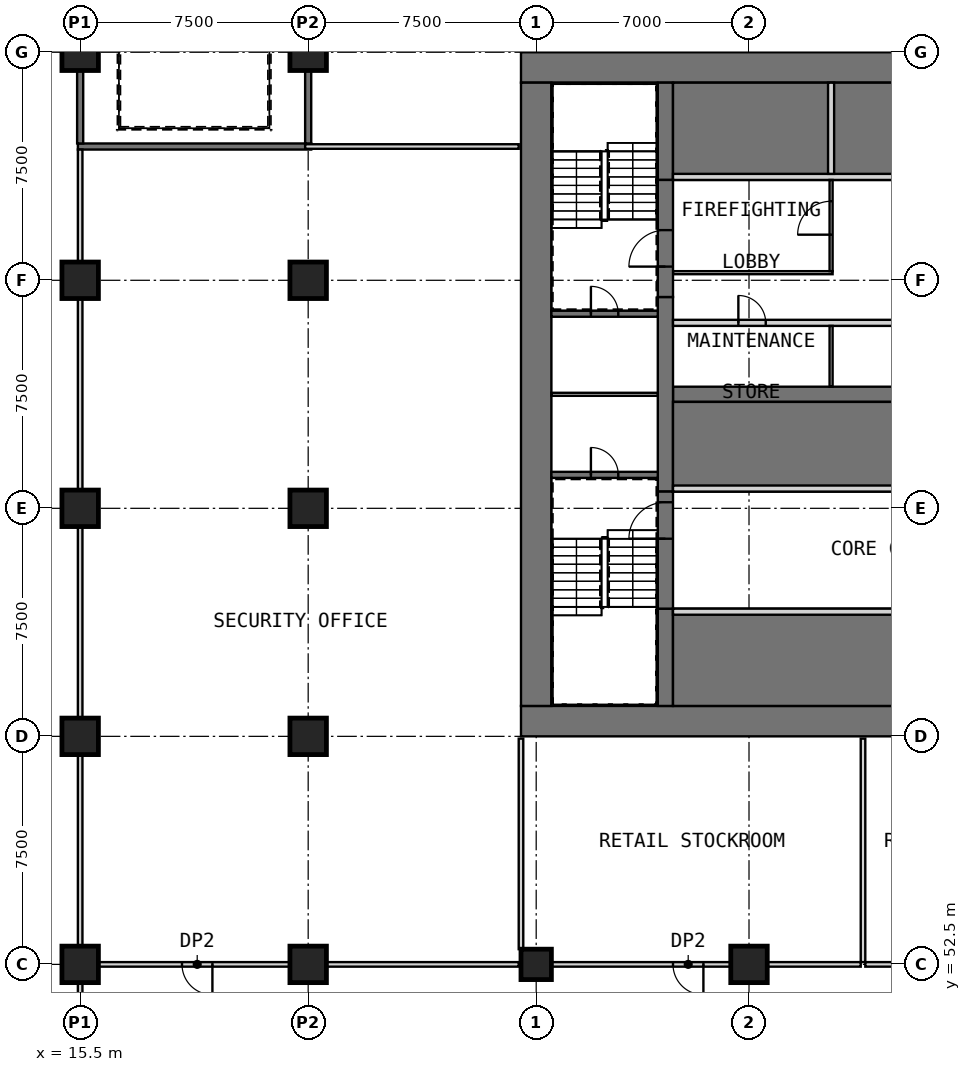
"""IFC4 building model, lengths in metres.
Left out: names, types, materials, properties, quantities, classifications, styles, units other than length and angle.
Written with IfcOpenShell. Run it as: python <this file> out.ifc"""

import sys

from ifc_helpers import new_model, si_unit, direction, frame, frame_2d, origin, origin_2d, place, context, subcontext, project, spatial, rectangle, extrude, element, fill, save


model = new_model("IFC4")
c1 = context("Model", 3, precision=1e-05, world=origin(), true_north=direction((0.0, 1.0)))
c2 = subcontext(c1, "Body", "Model", "MODEL_VIEW")
j1 = project(units=[si_unit("LENGTHUNIT", "METRE"), si_unit("PLANEANGLEUNIT", "RADIAN")], contexts=[c1])
p1 = place(None, origin())
s1 = spatial("IfcSite", under=j1, at=p1, CompositionType="ELEMENT")
p2 = place(p1, origin())
s2 = spatial("IfcBuilding", under=s1, at=p2, CompositionType="ELEMENT")
p3 = place(p2, frame((0.0, 0.0, -6.0)))
s3 = spatial("IfcBuildingStorey", under=s2, at=p3, CompositionType="ELEMENT", Elevation=-6.0)
p4 = place(p3, frame((30.5, 52.5, 0.0), z_axis=(0.0, 0.0, 1.0), x_axis=(1.0, 0.0, 0.0)))
e1 = element("IfcColumn", 1, at=p4, inside=s3, PredefinedType="COLUMN", context=c2, shape_type="SweptSolid", body=[
    extrude(rectangle(XDim=1.0, YDim=1.0, at=origin_2d()), origin(), (0.0, 0.0, 1.0), 6.0),
])
for number, where, z_axis, x_axis in (
    (2, (37.5, 52.5, 0.0), (0.0, 0.0, 1.0), (1.0, 0.0, 0.0)),
    (3, (15.5, 52.5, 0.0), (0.0, 0.0, 1.0), (1.0, 0.0, 0.0)),
    (4, (15.5, 60.0, 0.0), (0.0, 0.0, 1.0), (1.0, 0.0, 0.0)),
    (5, (15.5, 67.5, 0.0), (0.0, 0.0, 1.0), (1.0, 0.0, 0.0)),
    (6, (15.5, 75.0, 0.0), (0.0, 0.0, 1.0), (1.0, 0.0, 0.0)),
    (7, (15.5, 82.5, 0.0), (0.0, 0.0, 1.0), (1.0, 0.0, 0.0)),
    (8, (23.0, 52.5, 0.0), (0.0, 0.0, 1.0), (1.0, 0.0, 0.0)),
    (9, (23.0, 60.0, 0.0), (0.0, 0.0, 1.0), (1.0, 0.0, 0.0)),
    (10, (23.0, 67.5, 0.0), (0.0, 0.0, 1.0), (1.0, 0.0, 0.0)),
    (11, (23.0, 75.0, 0.0), (0.0, 0.0, 1.0), (1.0, 0.0, 0.0)),
    (12, (23.0, 82.5, 0.0), (0.0, 0.0, 1.0), (1.0, 0.0, 0.0)),
):
    element("IfcColumn", number, at=place(p3, frame(where, z_axis=z_axis, x_axis=x_axis)), inside=s3, PredefinedType="COLUMN", context=c2, shape_type="SweptSolid", body=[
        extrude(rectangle(XDim=1.2, YDim=1.2, at=origin_2d()), origin(), (0.0, 0.0, 1.0), 6.0),
    ])
p5 = place(p3, frame((30.0, 60.5, 0.0), z_axis=(0.0, 0.0, 1.0), x_axis=(1.0, 0.0, 0.0)))
e13 = element("IfcWall", 13, at=p5, inside=s3, PredefinedType="SHEAR", context=c2, shape_type="SweptSolid", body=[
    extrude(rectangle(XDim=30.0, YDim=1.0, at=frame_2d((15.0, 0.0))), origin(), (0.0, 0.0, 1.0), 6.0),
])
p6 = place(p5, frame((21.9, 0.0, 0.0)))
e14 = element("IfcOpeningElement", 14, at=p6, cuts=e13, PredefinedType="OPENING", context=c2, shape_type="SweptSolid", body=[
    extrude(rectangle(XDim=1.8, YDim=2.1, at=frame_2d((0.9, 1.05))), frame((0.0, 0.51, 0.0), z_axis=(0.0, -1.0, 0.0), x_axis=(1.0, 0.0, 0.0)), (0.0, 0.0, 1.0), 1.02),
])
p7 = place(p5, frame((26.5, 0.0, 0.0)))
e15 = element("IfcOpeningElement", 15, at=p7, cuts=e13, PredefinedType="OPENING", context=c2, shape_type="SweptSolid", body=[
    extrude(rectangle(XDim=1.2, YDim=2.1, at=frame_2d((0.6, 1.05))), frame((0.0, 0.51, 0.0), z_axis=(0.0, -1.0, 0.0), x_axis=(1.0, 0.0, 0.0)), (0.0, 0.0, 1.0), 1.02),
])
p8 = place(p3, frame((30.0, 82.0, 0.0), z_axis=(0.0, 0.0, 1.0), x_axis=(1.0, 0.0, 0.0)))
e16 = element("IfcWall", 16, at=p8, inside=s3, PredefinedType="SHEAR", context=c2, shape_type="SweptSolid", body=[
    extrude(rectangle(XDim=30.0, YDim=1.0, at=frame_2d((15.0, 0.0))), origin(), (0.0, 0.0, 1.0), 6.0),
])
p9 = place(p3, frame((30.5, 61.0, 0.0), z_axis=(0.0, 0.0, 1.0), x_axis=(0.0, 1.0, 0.0)))
e17 = element("IfcWall", 17, at=p9, inside=s3, PredefinedType="SHEAR", context=c2, shape_type="SweptSolid", body=[
    extrude(rectangle(XDim=20.5, YDim=1.0, at=frame_2d((10.25, 0.0))), origin(), (0.0, 0.0, 1.0), 6.0),
])
p10 = place(p3, frame((35.0, 71.25, 0.0), z_axis=(0.0, 0.0, 1.0), x_axis=(1.0, 0.0, 0.0)))
e18 = element("IfcWall", 18, at=p10, inside=s3, PredefinedType="SHEAR", context=c2, shape_type="SweptSolid", body=[
    extrude(rectangle(XDim=15.6, YDim=0.5, at=frame_2d((7.8, 0.0))), origin(), (0.0, 0.0, 1.0), 6.0),
])
p11 = place(p3, frame((34.75, 61.0, 0.0), z_axis=(0.0, 0.0, 1.0), x_axis=(0.0, 1.0, 0.0)))
e19 = element("IfcWall", 19, at=p11, inside=s3, PredefinedType="SHEAR", context=c2, shape_type="SweptSolid", body=[
    extrude(rectangle(XDim=3.2, YDim=0.5, at=frame_2d((1.6, 0.0))), origin(), (0.0, 0.0, 1.0), 6.0),
])
p12 = place(p3, frame((34.75, 68.05, 0.0), z_axis=(0.0, 0.0, 1.0), x_axis=(0.0, 1.0, 0.0)))
e20 = element("IfcWall", 20, at=p12, inside=s3, PredefinedType="SHEAR", context=c2, shape_type="SweptSolid", body=[
    extrude(rectangle(XDim=6.4, YDim=0.5, at=frame_2d((3.2, 0.0))), origin(), (0.0, 0.0, 1.0), 6.0),
])
p13 = place(p3, frame((34.75, 78.3, 0.0), z_axis=(0.0, 0.0, 1.0), x_axis=(0.0, 1.0, 0.0)))
e21 = element("IfcWall", 21, at=p13, inside=s3, PredefinedType="SHEAR", context=c2, shape_type="SweptSolid", body=[
    extrude(rectangle(XDim=3.2, YDim=0.5, at=frame_2d((1.6, 0.0))), origin(), (0.0, 0.0, 1.0), 6.0),
])
p14 = place(p3, frame((35.0, 62.6, 0.0), z_axis=(0.0, 0.0, 1.0), x_axis=(1.0, 0.0, 0.0)))
e22 = element("IfcWall", 22, at=p14, inside=s3, PredefinedType="SOLIDWALL", context=c2, shape_type="SweptSolid", body=[
    extrude(rectangle(XDim=13.0, YDim=3.2, at=frame_2d((6.5, 0.0))), origin(), (0.0, 0.0, 1.0), 4.4),
])
p15 = place(p3, frame((35.0, 64.1, 4.4), z_axis=(0.0, 0.0, 1.0), x_axis=(1.0, 0.0, 0.0)))
e23 = element("IfcWall", 23, at=p15, inside=s3, PredefinedType="SOLIDWALL", context=c2, shape_type="SweptSolid", body=[
    extrude(rectangle(XDim=13.0, YDim=0.2, at=frame_2d((6.5, 0.0))), origin(), (0.0, 0.0, 1.0), 1.6),
])
p16 = place(p3, frame((35.0, 69.525, 0.0), z_axis=(0.0, 0.0, 1.0), x_axis=(1.0, 0.0, 0.0)))
e24 = element("IfcWall", 24, at=p16, inside=s3, PredefinedType="SOLIDWALL", context=c2, shape_type="SweptSolid", body=[
    extrude(rectangle(XDim=13.0, YDim=2.95, at=frame_2d((6.5, 0.0))), origin(), (0.0, 0.0, 1.0), 4.4),
])
p17 = place(p3, frame((35.0, 68.15, 4.4), z_axis=(0.0, 0.0, 1.0), x_axis=(1.0, 0.0, 0.0)))
e25 = element("IfcWall", 25, at=p17, inside=s3, PredefinedType="SOLIDWALL", context=c2, shape_type="SweptSolid", body=[
    extrude(rectangle(XDim=13.0, YDim=0.2, at=frame_2d((6.5, 0.0))), origin(), (0.0, 0.0, 1.0), 1.6),
])
p18 = place(p3, frame((35.0, 73.6, 0.0), z_axis=(0.0, 0.0, 1.0), x_axis=(1.0, 0.0, 0.0)))
e26 = element("IfcWall", 26, at=p18, inside=s3, PredefinedType="PARTITIONING", context=c2, shape_type="SweptSolid", body=[
    extrude(rectangle(XDim=15.6, YDim=0.2, at=frame_2d((7.8, 0.0))), origin(), (0.0, 0.0, 1.0), 5.7),
])
p19 = place(p18, frame((2.15, 0.0, 0.0)))
e27 = element("IfcOpeningElement", 27, at=p19, cuts=e26, PredefinedType="OPENING", context=c2, shape_type="SweptSolid", body=[
    extrude(rectangle(XDim=0.9, YDim=2.1, at=frame_2d((0.45, 1.05))), frame((0.0, 0.11, 0.0), z_axis=(0.0, -1.0, 0.0), x_axis=(1.0, 0.0, 0.0)), (0.0, 0.0, 1.0), 0.22),
])
p20 = place(p18, frame((9.95, 0.0, 0.0)))
e28 = element("IfcOpeningElement", 28, at=p20, cuts=e26, PredefinedType="OPENING", context=c2, shape_type="SweptSolid", body=[
    extrude(rectangle(XDim=0.9, YDim=2.1, at=frame_2d((0.45, 1.05))), frame((0.0, 0.11, 0.0), z_axis=(0.0, -1.0, 0.0), x_axis=(1.0, 0.0, 0.0)), (0.0, 0.0, 1.0), 0.22),
])
p21 = place(p3, frame((40.2, 71.5, 0.0), z_axis=(0.0, 0.0, 1.0), x_axis=(0.0, 1.0, 0.0)))
e29 = element("IfcWall", 29, at=p21, inside=s3, PredefinedType="PARTITIONING", context=c2, shape_type="SweptSolid", body=[
    extrude(rectangle(XDim=2.0, YDim=0.1, at=frame_2d((1.0, 0.0))), origin(), (0.0, 0.0, 1.0), 5.7),
])
p22 = place(p3, frame((35.0, 79.9, 0.0), z_axis=(0.0, 0.0, 1.0), x_axis=(1.0, 0.0, 0.0)))
e30 = element("IfcWall", 30, at=p22, inside=s3, PredefinedType="SOLIDWALL", context=c2, shape_type="SweptSolid", body=[
    extrude(rectangle(XDim=10.4, YDim=3.2, at=frame_2d((5.2, 0.0))), origin(), (0.0, 0.0, 1.0), 4.4),
])
p23 = place(p3, frame((35.0, 78.4, 4.4), z_axis=(0.0, 0.0, 1.0), x_axis=(1.0, 0.0, 0.0)))
e31 = element("IfcWall", 31, at=p23, inside=s3, PredefinedType="SOLIDWALL", context=c2, shape_type="SweptSolid", body=[
    extrude(rectangle(XDim=10.4, YDim=0.2, at=frame_2d((5.2, 0.0))), origin(), (0.0, 0.0, 1.0), 1.6),
])
p24 = place(p3, frame((40.2, 78.5, 4.4), z_axis=(0.0, 0.0, 1.0), x_axis=(0.0, 1.0, 0.0)))
e32 = element("IfcWall", 32, at=p24, inside=s3, PredefinedType="SOLIDWALL", context=c2, shape_type="SweptSolid", body=[
    extrude(rectangle(XDim=3.0, YDim=0.2, at=frame_2d((1.5, 0.0))), origin(), (0.0, 0.0, 1.0), 1.6),
])
p25 = place(p3, frame((35.0, 75.25, 0.0), z_axis=(0.0, 0.0, 1.0), x_axis=(1.0, 0.0, 0.0)))
e33 = element("IfcWall", 33, at=p25, inside=s3, PredefinedType="PARTITIONING", context=c2, shape_type="SweptSolid", body=[
    extrude(rectangle(XDim=5.25, YDim=0.1, at=frame_2d((2.625, 0.0))), origin(), (0.0, 0.0, 1.0), 5.7),
])
p26 = place(p3, frame((40.2, 75.3, 0.0), z_axis=(0.0, 0.0, 1.0), x_axis=(0.0, 1.0, 0.0)))
e34 = element("IfcWall", 34, at=p26, inside=s3, PredefinedType="PARTITIONING", context=c2, shape_type="SweptSolid", body=[
    extrude(rectangle(XDim=3.0, YDim=0.1, at=frame_2d((1.5, 0.0))), origin(), (0.0, 0.0, 1.0), 5.7),
])
p27 = place(p26, frame((1.2, 0.0, 0.0)))
e35 = element("IfcOpeningElement", 35, at=p27, cuts=e34, PredefinedType="OPENING", context=c2, shape_type="SweptSolid", body=[
    extrude(rectangle(XDim=1.1, YDim=2.1, at=frame_2d((0.55, 1.05))), frame((0.0, 0.06, 0.0), z_axis=(0.0, -1.0, 0.0), x_axis=(1.0, 0.0, 0.0)), (0.0, 0.0, 1.0), 0.12),
])
p28 = place(p3, frame((34.75, 64.2, 0.0), z_axis=(0.0, 0.0, 1.0), x_axis=(0.0, 1.0, 0.0)))
e36 = element("IfcWall", 36, at=p28, inside=s3, PredefinedType="SOLIDWALL", context=c2, shape_type="SweptSolid", body=[
    extrude(rectangle(XDim=3.85, YDim=0.5, at=frame_2d((1.925, 0.0))), origin(), (0.0, 0.0, 1.0), 4.8),
])
p29 = place(p28, frame((2.3, 0.0, 0.0)))
e37 = element("IfcOpeningElement", 37, at=p29, cuts=e36, PredefinedType="OPENING", context=c2, shape_type="SweptSolid", body=[
    extrude(rectangle(XDim=1.2, YDim=2.1, at=frame_2d((0.6, 1.05))), frame((0.0, 0.26, 0.0), z_axis=(0.0, -1.0, 0.0), x_axis=(1.0, 0.0, 0.0)), (0.0, 0.0, 1.0), 0.52),
])
p30 = place(p3, frame((34.75, 74.45, 0.0), z_axis=(0.0, 0.0, 1.0), x_axis=(0.0, 1.0, 0.0)))
e38 = element("IfcWall", 38, at=p30, inside=s3, PredefinedType="SOLIDWALL", context=c2, shape_type="SweptSolid", body=[
    extrude(rectangle(XDim=3.85, YDim=0.5, at=frame_2d((1.925, 0.0))), origin(), (0.0, 0.0, 1.0), 4.8),
])
p31 = place(p30, frame((1.0, 0.0, 0.0)))
e39 = element("IfcOpeningElement", 39, at=p31, cuts=e38, PredefinedType="OPENING", context=c2, shape_type="SweptSolid", body=[
    extrude(rectangle(XDim=1.2, YDim=2.1, at=frame_2d((0.6, 1.05))), frame((0.0, 0.26, 0.0), z_axis=(0.0, -1.0, 0.0), x_axis=(1.0, 0.0, 0.0)), (0.0, 0.0, 1.0), 0.52),
])
p32 = place(p3, frame((31.0, 68.6, 0.0), z_axis=(0.0, 0.0, 1.0), x_axis=(1.0, 0.0, 0.0)))
e40 = element("IfcWall", 40, at=p32, inside=s3, PredefinedType="SOLIDWALL", context=c2, shape_type="SweptSolid", body=[
    extrude(rectangle(XDim=3.5, YDim=0.2, at=frame_2d((1.75, 0.0))), origin(), (0.0, 0.0, 1.0), 5.7),
])
p33 = place(p32, frame((1.3, 0.0, 0.0)))
e41 = element("IfcOpeningElement", 41, at=p33, cuts=e40, PredefinedType="OPENING", context=c2, shape_type="SweptSolid", body=[
    extrude(rectangle(XDim=0.9, YDim=2.1, at=frame_2d((0.45, 1.05))), frame((0.0, 0.11, 0.0), z_axis=(0.0, -1.0, 0.0), x_axis=(1.0, 0.0, 0.0)), (0.0, 0.0, 1.0), 0.22),
])
p34 = place(p3, frame((31.0, 73.9, 0.0), z_axis=(0.0, 0.0, 1.0), x_axis=(1.0, 0.0, 0.0)))
e42 = element("IfcWall", 42, at=p34, inside=s3, PredefinedType="SOLIDWALL", context=c2, shape_type="SweptSolid", body=[
    extrude(rectangle(XDim=3.5, YDim=0.2, at=frame_2d((1.75, 0.0))), origin(), (0.0, 0.0, 1.0), 5.7),
])
p35 = place(p34, frame((1.3, 0.0, 0.0)))
e43 = element("IfcOpeningElement", 43, at=p35, cuts=e42, PredefinedType="OPENING", context=c2, shape_type="SweptSolid", body=[
    extrude(rectangle(XDim=0.9, YDim=2.1, at=frame_2d((0.45, 1.05))), frame((0.0, 0.11, 0.0), z_axis=(0.0, -1.0, 0.0), x_axis=(1.0, 0.0, 0.0)), (0.0, 0.0, 1.0), 0.22),
])
p36 = place(p3, frame((31.0, 71.25, 0.0), z_axis=(0.0, 0.0, 1.0), x_axis=(1.0, 0.0, 0.0)))
e44 = element("IfcWall", 44, at=p36, inside=s3, PredefinedType="PARTITIONING", context=c2, shape_type="SweptSolid", body=[
    extrude(rectangle(XDim=3.5, YDim=0.1, at=frame_2d((1.75, 0.0))), origin(), (0.0, 0.0, 1.0), 5.7),
])
p37 = place(p3, frame((22.4, 52.5, 0.0), z_axis=(0.0, 0.0, 1.0), x_axis=(-1.0, 0.0, 0.0)))
e45 = element("IfcWall", 45, at=p37, inside=s3, PredefinedType="PARTITIONING", context=c2, shape_type="SweptSolid", body=[
    extrude(rectangle(XDim=6.3, YDim=0.15, at=frame_2d((3.15, 0.0))), origin(), (0.0, 0.0, 1.0), 5.7),
])
p38 = place(p37, frame((2.55, 0.0, 0.0)))
e46 = element("IfcOpeningElement", 46, at=p38, cuts=e45, PredefinedType="OPENING", context=c2, shape_type="SweptSolid", body=[
    extrude(rectangle(XDim=1.0, YDim=2.1, at=frame_2d((0.5, 1.05))), frame((0.0, 0.085, 0.0), z_axis=(0.0, -1.0, 0.0), x_axis=(1.0, 0.0, 0.0)), (0.0, 0.0, 1.0), 0.17),
])
p39 = place(p3, frame((23.6, 52.5, 0.0), z_axis=(0.0, 0.0, 1.0), x_axis=(1.0, 0.0, 0.0)))
e47 = element("IfcWall", 47, at=p39, inside=s3, PredefinedType="PARTITIONING", context=c2, shape_type="SweptSolid", body=[
    extrude(rectangle(XDim=6.325, YDim=0.15, at=frame_2d((3.163, 0.0))), origin(), (0.0, 0.0, 1.0), 5.7),
])
p40 = place(p3, frame((36.9, 52.5, 0.0), z_axis=(0.0, 0.0, 1.0), x_axis=(-1.0, 0.0, 0.0)))
e48 = element("IfcWall", 48, at=p40, inside=s3, PredefinedType="PARTITIONING", context=c2, shape_type="SweptSolid", body=[
    extrude(rectangle(XDim=5.9, YDim=0.15, at=frame_2d((2.95, 0.0))), origin(), (0.0, 0.0, 1.0), 5.7),
])
p41 = place(p40, frame((0.9, 0.0, 0.0)))
e49 = element("IfcOpeningElement", 49, at=p41, cuts=e48, PredefinedType="OPENING", context=c2, shape_type="SweptSolid", body=[
    extrude(rectangle(XDim=1.0, YDim=2.1, at=frame_2d((0.5, 1.05))), frame((0.0, 0.085, 0.0), z_axis=(0.0, -1.0, 0.0), x_axis=(1.0, 0.0, 0.0)), (0.0, 0.0, 1.0), 0.17),
])
for number, where, z_axis, x_axis in (
    (50, (38.1, 52.5, 0.0), (0.0, 0.0, 1.0), (1.0, 0.0, 0.0)),
    (51, (41.325, 52.5, 0.0), (0.0, 0.0, 1.0), (1.0, 0.0, 0.0)),
):
    element("IfcWall", number, at=place(p3, frame(where, z_axis=z_axis, x_axis=x_axis)), inside=s3, PredefinedType="PARTITIONING", context=c2, shape_type="SweptSolid", body=[
        extrude(rectangle(XDim=3.075, YDim=0.15, at=frame_2d((1.538, 0.0))), origin(), (0.0, 0.0, 1.0), 5.7),
    ])
p42 = place(p3, frame((15.425, 79.4, 0.0), z_axis=(0.0, 0.0, 1.0), x_axis=(1.0, 0.0, 0.0)))
e52 = element("IfcWall", 52, at=p42, inside=s3, PredefinedType="SHEAR", context=c2, shape_type="SweptSolid", body=[
    extrude(rectangle(XDim=7.675, YDim=0.2, at=frame_2d((3.837, 0.0))), origin(), (0.0, 0.0, 1.0), 5.1),
])
p43 = place(p3, frame((22.9, 79.4, 0.0), z_axis=(0.0, 0.0, 1.0), x_axis=(1.0, 0.0, 0.0)))
e53 = element("IfcWall", 53, at=p43, inside=s3, PredefinedType="PARTITIONING", context=c2, shape_type="SweptSolid", body=[
    extrude(rectangle(XDim=7.025, YDim=0.15, at=frame_2d((3.513, 0.0))), origin(), (0.0, 0.0, 1.0), 5.7),
])
p44 = place(p3, frame((15.5, 46.1, 0.0), z_axis=(0.0, 0.0, 1.0), x_axis=(0.0, 1.0, 0.0)))
e54 = element("IfcWall", 54, at=p44, inside=s3, PredefinedType="PARTITIONING", context=c2, shape_type="SweptSolid", body=[
    extrude(rectangle(XDim=5.8, YDim=0.15, at=frame_2d((2.9, 0.0))), origin(), (0.0, 0.0, 1.0), 5.1),
])
for number, where, z_axis, x_axis in (
    (55, (15.5, 53.1, 0.0), (0.0, 0.0, 1.0), (0.0, 1.0, 0.0)),
    (56, (15.5, 60.6, 0.0), (0.0, 0.0, 1.0), (0.0, 1.0, 0.0)),
    (57, (15.5, 68.1, 0.0), (0.0, 0.0, 1.0), (0.0, 1.0, 0.0)),
):
    element("IfcWall", number, at=place(p3, frame(where, z_axis=z_axis, x_axis=x_axis)), inside=s3, PredefinedType="PARTITIONING", context=c2, shape_type="SweptSolid", body=[
        extrude(rectangle(XDim=6.3, YDim=0.15, at=frame_2d((3.15, 0.0))), origin(), (0.0, 0.0, 1.0), 5.1),
    ])
p45 = place(p3, frame((15.5, 75.6, 0.0), z_axis=(0.0, 0.0, 1.0), x_axis=(0.0, 1.0, 0.0)))
e58 = element("IfcWall", 58, at=p45, inside=s3, PredefinedType="PARTITIONING", context=c2, shape_type="SweptSolid", body=[
    extrude(rectangle(XDim=3.7, YDim=0.15, at=frame_2d((1.85, 0.0))), origin(), (0.0, 0.0, 1.0), 5.1),
])
p46 = place(p3, frame((15.5, 79.5, 0.0), z_axis=(0.0, 0.0, 1.0), x_axis=(0.0, 1.0, 0.0)))
e59 = element("IfcWall", 59, at=p46, inside=s3, PredefinedType="SHEAR", context=c2, shape_type="SweptSolid", body=[
    extrude(rectangle(XDim=2.4, YDim=0.2, at=frame_2d((1.2, 0.0))), origin(), (0.0, 0.0, 1.0), 5.1),
])
p47 = place(p3, frame((23.0, 79.5, 0.0), z_axis=(0.0, 0.0, 1.0), x_axis=(0.0, 1.0, 0.0)))
e60 = element("IfcWall", 60, at=p47, inside=s3, PredefinedType="SHEAR", context=c2, shape_type="SweptSolid", body=[
    extrude(rectangle(XDim=2.4, YDim=0.2, at=frame_2d((1.2, 0.0))), origin(), (0.0, 0.0, 1.0), 5.7),
])
p48 = place(p3, frame((41.25, 52.575, 0.0), z_axis=(0.0, 0.0, 1.0), x_axis=(0.0, 1.0, 0.0)))
e61 = element("IfcWall", 61, at=p48, inside=s3, PredefinedType="PARTITIONING", context=c2, shape_type="SweptSolid", body=[
    extrude(rectangle(XDim=7.35, YDim=0.15, at=frame_2d((3.675, 0.0))), origin(), (0.0, 0.0, 1.0), 5.7),
])
p49 = place(p3, frame((30.0, 53.0, 0.0), z_axis=(0.0, 0.0, 1.0), x_axis=(0.0, 1.0, 0.0)))
e62 = element("IfcWall", 62, at=p49, inside=s3, PredefinedType="PARTITIONING", context=c2, shape_type="SweptSolid", body=[
    extrude(rectangle(XDim=6.925, YDim=0.15, at=frame_2d((3.462, 0.0))), origin(), (0.0, 0.0, 1.0), 5.7),
])
p50 = place(p19, origin())
e63 = element("IfcDoor", 63, at=p50, inside=s3, OperationType="SINGLE_SWING_LEFT", PredefinedType="DOOR", context=c2, shape_type="SweptSolid", body=[
    extrude(rectangle(XDim=0.9, YDim=2.1, at=frame_2d((0.45, 1.05))), frame((0.0, 0.025, 0.0), z_axis=(0.0, -1.0, 0.0), x_axis=(1.0, 0.0, 0.0)), (0.0, 0.0, 1.0), 0.05),
])
fill(e27, e63)
p51 = place(p27, origin())
e64 = element("IfcDoor", 64, at=p51, inside=s3, OperationType="SINGLE_SWING_LEFT", PredefinedType="DOOR", context=c2, shape_type="SweptSolid", body=[
    extrude(rectangle(XDim=1.1, YDim=2.1, at=frame_2d((0.55, 1.05))), frame((0.0, 0.025, 0.0), z_axis=(0.0, -1.0, 0.0), x_axis=(1.0, 0.0, 0.0)), (0.0, 0.0, 1.0), 0.05),
])
fill(e35, e64)
p52 = place(p29, origin())
e65 = element("IfcDoor", 65, at=p52, inside=s3, OperationType="SINGLE_SWING_LEFT", PredefinedType="DOOR", context=c2, shape_type="SweptSolid", body=[
    extrude(rectangle(XDim=1.2, YDim=2.1, at=frame_2d((0.6, 1.05))), frame((0.0, 0.025, 0.0), z_axis=(0.0, -1.0, 0.0), x_axis=(1.0, 0.0, 0.0)), (0.0, 0.0, 1.0), 0.05),
])
fill(e37, e65)
p53 = place(p31, origin())
e66 = element("IfcDoor", 66, at=p53, inside=s3, OperationType="SINGLE_SWING_RIGHT", PredefinedType="DOOR", context=c2, shape_type="SweptSolid", body=[
    extrude(rectangle(XDim=1.2, YDim=2.1, at=frame_2d((0.6, 1.05))), frame((0.0, 0.025, 0.0), z_axis=(0.0, -1.0, 0.0), x_axis=(1.0, 0.0, 0.0)), (0.0, 0.0, 1.0), 0.05),
])
fill(e39, e66)
p54 = place(p33, origin())
e67 = element("IfcDoor", 67, at=p54, inside=s3, OperationType="SINGLE_SWING_LEFT", PredefinedType="DOOR", context=c2, shape_type="SweptSolid", body=[
    extrude(rectangle(XDim=0.9, YDim=2.1, at=frame_2d((0.45, 1.05))), frame((0.0, 0.025, 0.0), z_axis=(0.0, -1.0, 0.0), x_axis=(1.0, 0.0, 0.0)), (0.0, 0.0, 1.0), 0.05),
])
fill(e41, e67)
p55 = place(p35, origin())
e68 = element("IfcDoor", 68, at=p55, inside=s3, OperationType="SINGLE_SWING_RIGHT", PredefinedType="DOOR", context=c2, shape_type="SweptSolid", body=[
    extrude(rectangle(XDim=0.9, YDim=2.1, at=frame_2d((0.45, 1.05))), frame((0.0, 0.025, 0.0), z_axis=(0.0, -1.0, 0.0), x_axis=(1.0, 0.0, 0.0)), (0.0, 0.0, 1.0), 0.05),
])
fill(e43, e68)
p56 = place(p38, origin())
e69 = element("IfcDoor", 69, at=p56, inside=s3, OperationType="SINGLE_SWING_LEFT", PredefinedType="DOOR", context=c2, shape_type="SweptSolid", body=[
    extrude(rectangle(XDim=1.0, YDim=2.1, at=frame_2d((0.5, 1.05))), frame((0.0, 0.025, 0.0), z_axis=(0.0, -1.0, 0.0), x_axis=(1.0, 0.0, 0.0)), (0.0, 0.0, 1.0), 0.05),
])
fill(e46, e69)
p57 = place(p41, origin())
e70 = element("IfcDoor", 70, at=p57, inside=s3, OperationType="SINGLE_SWING_LEFT", PredefinedType="DOOR", context=c2, shape_type="SweptSolid", body=[
    extrude(rectangle(XDim=1.0, YDim=2.1, at=frame_2d((0.5, 1.05))), frame((0.0, 0.025, 0.0), z_axis=(0.0, -1.0, 0.0), x_axis=(1.0, 0.0, 0.0)), (0.0, 0.0, 1.0), 0.05),
])
fill(e49, e70)
save(model, sys.argv[1])
